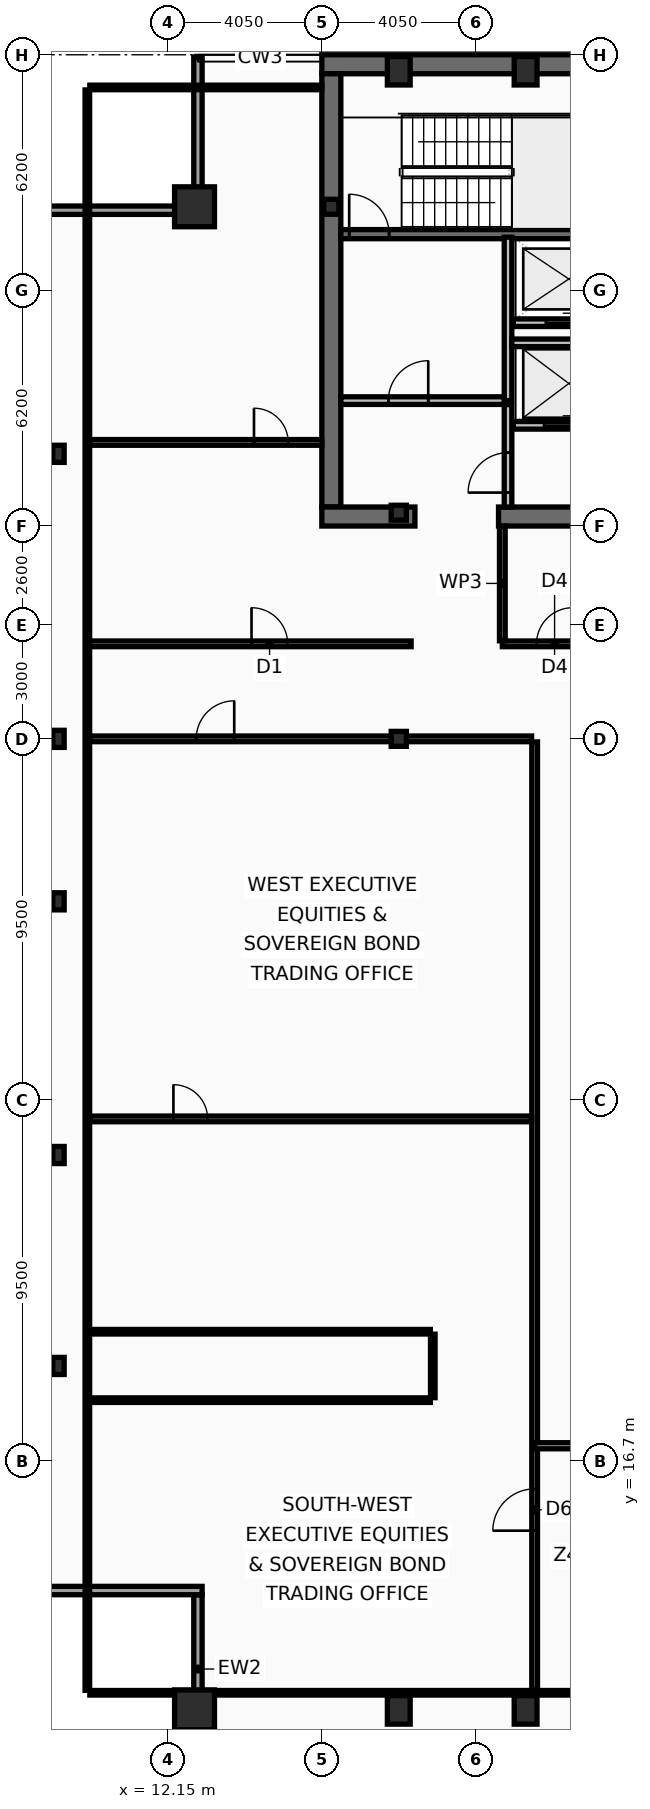
"""IFC4 building model, lengths in metres.
Left out: names, types, materials, properties, quantities, classifications, styles, units other than length and angle.
Written with IfcOpenShell. Run it as: python <this file> out.ifc"""

import sys

from ifc_helpers import new_model, si_unit, direction, frame, frame_2d, origin, origin_2d, place, context, subcontext, project, spatial, rectangle, hollow_rectangle, i_section, extrude, element, fill, save


model = new_model("IFC4")
c1 = context("Model", 3, precision=1e-05, world=origin(), true_north=direction((0.0, 1.0)))
c2 = subcontext(c1, "Body", "Model", "MODEL_VIEW")
j1 = project(units=[si_unit("LENGTHUNIT", "METRE"), si_unit("PLANEANGLEUNIT", "RADIAN")], contexts=[c1])
p1 = place(None, origin())
s1 = spatial("IfcSite", under=j1, at=p1, CompositionType="ELEMENT")
p2 = place(p1, origin())
s2 = spatial("IfcBuilding", under=s1, at=p2, CompositionType="ELEMENT")
p3 = place(p2, frame((0.0, 0.0, 287.8)))
s3 = spatial("IfcBuildingStorey", under=s2, at=p3, CompositionType="ELEMENT", Elevation=287.8)
p4 = place(p3, frame((16.2, 53.45, 0.0), z_axis=(0.0, 0.0, 1.0), x_axis=(1.0, 0.0, 0.0)))
e1 = element("IfcWall", 1, at=p4, inside=s3, PredefinedType="SHEAR", context=c2, shape_type="SweptSolid", body=[
    extrude(rectangle(XDim=40.5, YDim=0.5, at=frame_2d((20.25, 0.0))), origin(), (0.0, 0.0, 1.0), 3.44),
])
p5 = place(p3, frame((16.45, 41.8, 0.0), z_axis=(0.0, 0.0, 1.0), x_axis=(0.0, 1.0, 0.0)))
e2 = element("IfcWall", 2, at=p5, inside=s3, PredefinedType="SHEAR", context=c2, shape_type="SweptSolid", body=[
    extrude(rectangle(XDim=11.4, YDim=0.5, at=frame_2d((5.7, 0.0))), origin(), (0.0, 0.0, 1.0), 3.44),
])
p6 = place(p3, frame((18.65, 41.55, 0.0), z_axis=(0.0, 0.0, 1.0), x_axis=(-1.0, 0.0, 0.0)))
e3 = element("IfcWall", 3, at=p6, inside=s3, PredefinedType="SHEAR", context=c2, shape_type="SweptSolid", body=[
    extrude(rectangle(XDim=2.45, YDim=0.5, at=frame_2d((1.225, 0.0))), origin(), (0.0, 0.0, 1.0), 3.44),
])
p7 = place(p3, frame((32.3, 41.55, 0.0), z_axis=(0.0, 0.0, 1.0), x_axis=(-1.0, 0.0, 0.0)))
e4 = element("IfcWall", 4, at=p7, inside=s3, PredefinedType="SHEAR", context=c2, shape_type="SweptSolid", body=[
    extrude(rectangle(XDim=11.45, YDim=0.5, at=frame_2d((5.725, 0.0))), origin(), (0.0, 0.0, 1.0), 3.44),
])
p8 = place(p3, frame((16.7, 48.98, 0.0), z_axis=(0.0, 0.0, 1.0), x_axis=(1.0, 0.0, 0.0)))
e5 = element("IfcWall", 5, at=p8, inside=s3, PredefinedType="SHEAR", context=c2, shape_type="SweptSolid", body=[
    extrude(rectangle(XDim=7.52, YDim=0.24, at=frame_2d((3.76, 0.0))), origin(), (0.0, 0.0, 1.0), 3.44),
])
p9 = place(p8, frame((0.22, 0.0, 0.0)))
e6 = element("IfcOpeningElement", 6, at=p9, cuts=e5, PredefinedType="OPENING", context=c2, shape_type="SweptSolid", body=[
    extrude(rectangle(XDim=1.05, YDim=2.15, at=frame_2d((0.525, 1.075))), frame((0.0, 0.13, 0.0), z_axis=(0.0, -1.0, 0.0), x_axis=(1.0, 0.0, 0.0)), (0.0, 0.0, 1.0), 0.26),
])
for number, where, z_axis, x_axis in (
    (7, (12.85, 10.15, 0.0), (0.0, 0.0, 1.0), (1.0, 0.0, 0.0)),
    (8, (12.85, 49.7, 0.0), (0.0, 0.0, 1.0), (1.0, 0.0, 0.0)),
):
    element("IfcColumn", number, at=place(p3, frame(where, z_axis=z_axis, x_axis=x_axis)), inside=s3, PredefinedType="COLUMN", context=c2, shape_type="SweptSolid", body=[
        extrude(hollow_rectangle(XDim=1.05, YDim=1.05, WallThickness=0.055, at=origin_2d()), origin(), (0.0, 0.0, 1.0), 3.6),
    ])
for number, where, z_axis, x_axis in (
    (9, (18.225, 10.15, 0.0), (0.0, 0.0, 1.0), (1.0, 0.0, 0.0)),
    (10, (21.562, 10.15, 0.0), (0.0, 0.0, 1.0), (1.0, 0.0, 0.0)),
    (11, (18.225, 53.28, 0.0), (0.0, 0.0, 1.0), (1.0, 0.0, 0.0)),
    (12, (21.562, 53.28, 0.0), (0.0, 0.0, 1.0), (1.0, 0.0, 0.0)),
):
    element("IfcColumn", number, at=place(p3, frame(where, z_axis=z_axis, x_axis=x_axis)), inside=s3, PredefinedType="COLUMN", context=c2, shape_type="SweptSolid", body=[
        extrude(hollow_rectangle(XDim=0.6, YDim=0.75, WallThickness=0.045, at=origin_2d()), origin(), (0.0, 0.0, 1.0), 3.6),
    ])
for number, where, z_axis, x_axis in (
    (13, (9.27, 19.2, 0.0), (0.0, 0.0, 1.0), (1.0, 0.0, 0.0)),
    (14, (9.27, 24.75, 0.0), (0.0, 0.0, 1.0), (1.0, 0.0, 0.0)),
    (15, (9.27, 31.425, 0.0), (0.0, 0.0, 1.0), (1.0, 0.0, 0.0)),
    (16, (9.27, 35.7, 0.0), (0.0, 0.0, 1.0), (1.0, 0.0, 0.0)),
    (17, (9.27, 43.2, 0.0), (0.0, 0.0, 1.0), (1.0, 0.0, 0.0)),
):
    element("IfcColumn", number, at=place(p3, frame(where, z_axis=z_axis, x_axis=x_axis)), inside=s3, PredefinedType="COLUMN", context=c2, shape_type="SweptSolid", body=[
        extrude(i_section(OverallWidth=0.3, OverallDepth=0.45, WebThickness=0.014, FlangeThickness=0.026, at=origin_2d()), origin(), (0.0, 0.0, 1.0), 3.6),
    ])
for number, where, z_axis, x_axis in (
    (18, (16.45, 49.7, 0.0), (0.0, 0.0, 1.0), (1.0, 0.0, 0.0)),
    (19, (18.225, 35.7, 0.0), (0.0, 0.0, 1.0), (1.0, 0.0, 0.0)),
    (20, (18.225, 41.65, 0.0), (0.0, 0.0, 1.0), (1.0, 0.0, 0.0)),
):
    element("IfcColumn", number, at=place(p3, frame(where, z_axis=z_axis, x_axis=x_axis)), inside=s3, PredefinedType="COLUMN", context=c2, shape_type="SweptSolid", body=[
        extrude(i_section(OverallWidth=0.399, OverallDepth=0.393, WebThickness=0.023, FlangeThickness=0.037, at=origin_2d()), origin(), (0.0, 0.0, 1.0), 3.6),
    ])
p10 = place(p3, frame((12.94, 9.27, 0.0), z_axis=(0.0, 0.0, 1.0), x_axis=(0.0, 1.0, 0.0)))
e21 = element("IfcWall", 21, at=p10, inside=s3, PredefinedType="SOLIDWALL", context=c2, shape_type="SweptSolid", body=[
    extrude(rectangle(XDim=3.91, YDim=0.22, at=frame_2d((1.955, 0.0))), origin(), (0.0, 0.0, 1.0), 2.09),
])
p11 = place(p3, frame((13.05, 13.29, 0.0), z_axis=(0.0, 0.0, 1.0), x_axis=(-1.0, 0.0, 0.0)))
e22 = element("IfcWall", 22, at=p11, inside=s3, PredefinedType="SOLIDWALL", context=c2, shape_type="SweptSolid", body=[
    extrude(rectangle(XDim=4.13, YDim=0.22, at=frame_2d((2.065, 0.0))), origin(), (0.0, 0.0, 1.0), 2.88),
])
p12 = place(p3, frame((8.92, 49.61, 0.0), z_axis=(0.0, 0.0, 1.0), x_axis=(1.0, 0.0, 0.0)))
e23 = element("IfcWall", 23, at=p12, inside=s3, PredefinedType="SOLIDWALL", context=c2, shape_type="SweptSolid", body=[
    extrude(rectangle(XDim=4.13, YDim=0.22, at=frame_2d((2.065, 0.0))), origin(), (0.0, 0.0, 1.0), 2.09),
])
p13 = place(p3, frame((12.94, 49.72, 0.0), z_axis=(0.0, 0.0, 1.0), x_axis=(0.0, 1.0, 0.0)))
e24 = element("IfcWall", 24, at=p13, inside=s3, PredefinedType="SOLIDWALL", context=c2, shape_type="SweptSolid", body=[
    extrude(rectangle(XDim=3.91, YDim=0.22, at=frame_2d((1.955, 0.0))), origin(), (0.0, 0.0, 1.0), 2.09),
])
p14 = place(p3, frame((24.21, 43.95, 0.0), z_axis=(0.0, 0.0, 1.0), x_axis=(-1.0, 0.0, 0.0)))
e25 = element("IfcWall", 25, at=p14, inside=s3, PredefinedType="PARTITIONING", context=c2, shape_type="SweptSolid", body=[
    extrude(rectangle(XDim=2.97, YDim=0.2, at=frame_2d((1.485, 0.0))), origin(), (0.0, 0.0, 1.0), 3.44),
])
p15 = place(p14, frame((0.86, 0.0, 0.0)))
e26 = element("IfcOpeningElement", 26, at=p15, cuts=e25, PredefinedType="OPENING", context=c2, shape_type="SweptSolid", body=[
    extrude(rectangle(XDim=1.3, YDim=2.18, at=frame_2d((0.65, 1.09))), frame((0.0, 0.11, 0.0), z_axis=(0.0, -1.0, 0.0), x_axis=(1.0, 0.0, 0.0)), (0.0, 0.0, 1.0), 0.22),
])
p16 = place(p3, frame((24.21, 46.65, 0.0), z_axis=(0.0, 0.0, 1.0), x_axis=(-1.0, 0.0, 0.0)))
e27 = element("IfcWall", 27, at=p16, inside=s3, PredefinedType="PARTITIONING", context=c2, shape_type="SweptSolid", body=[
    extrude(rectangle(XDim=2.97, YDim=0.2, at=frame_2d((1.485, 0.0))), origin(), (0.0, 0.0, 1.0), 3.44),
])
p17 = place(p16, frame((0.91, 0.0, 0.0)))
e28 = element("IfcOpeningElement", 28, at=p17, cuts=e27, PredefinedType="OPENING", context=c2, shape_type="SweptSolid", body=[
    extrude(rectangle(XDim=1.2, YDim=2.18, at=frame_2d((0.6, 1.09))), frame((0.0, 0.11, 0.0), z_axis=(0.0, -1.0, 0.0), x_axis=(1.0, 0.0, 0.0)), (0.0, 0.0, 1.0), 0.22),
])
p18 = place(p3, frame((21.1, 44.6, 0.0), z_axis=(0.0, 0.0, 1.0), x_axis=(0.0, 1.0, 0.0)))
e29 = element("IfcWall", 29, at=p18, inside=s3, PredefinedType="PARTITIONING", context=c2, shape_type="SweptSolid", body=[
    extrude(rectangle(XDim=4.3, YDim=0.2, at=frame_2d((2.15, 0.0))), origin(), (0.0, 0.0, 1.0), 3.44),
])
p19 = place(p3, frame((16.7, 44.6, 0.0), z_axis=(0.0, 0.0, 1.0), x_axis=(1.0, 0.0, 0.0)))
e30 = element("IfcWall", 30, at=p19, inside=s3, PredefinedType="PARTITIONING", context=c2, shape_type="SweptSolid", body=[
    extrude(rectangle(XDim=4.3, YDim=0.2, at=frame_2d((2.15, 0.0))), origin(), (0.0, 0.0, 1.0), 3.44),
])
p20 = place(p19, frame((1.25, 0.0, 0.0)))
e31 = element("IfcOpeningElement", 31, at=p20, cuts=e30, PredefinedType="OPENING", context=c2, shape_type="SweptSolid", body=[
    extrude(rectangle(XDim=1.05, YDim=2.15, at=frame_2d((0.525, 1.075))), frame((0.0, 0.11, 0.0), z_axis=(0.0, -1.0, 0.0), x_axis=(1.0, 0.0, 0.0)), (0.0, 0.0, 1.0), 0.22),
])
p21 = place(p3, frame((21.2, 46.12, 0.0), z_axis=(0.0, 0.0, 1.0), x_axis=(1.0, 0.0, 0.0)))
e32 = element("IfcWall", 32, at=p21, inside=s3, PredefinedType="PARTITIONING", context=c2, shape_type="SweptSolid", body=[
    extrude(rectangle(XDim=3.02, YDim=0.2, at=frame_2d((1.51, 0.0))), origin(), (0.0, 0.0, 1.0), 3.44),
])
p22 = place(p3, frame((21.1, 41.8, 0.0), z_axis=(0.0, 0.0, 1.0), x_axis=(0.0, 1.0, 0.0)))
e33 = element("IfcWall", 33, at=p22, inside=s3, PredefinedType="PARTITIONING", context=c2, shape_type="SweptSolid", body=[
    extrude(rectangle(XDim=2.695, YDim=0.2, at=frame_2d((1.348, 0.0))), origin(), (0.0, 0.0, 1.0), 3.44),
])
p23 = place(p22, frame((0.38, 0.0, 0.0)))
e34 = element("IfcOpeningElement", 34, at=p23, cuts=e33, PredefinedType="OPENING", context=c2, shape_type="SweptSolid", body=[
    extrude(rectangle(XDim=1.05, YDim=2.15, at=frame_2d((0.525, 1.075))), frame((0.0, 0.11, 0.0), z_axis=(0.0, -1.0, 0.0), x_axis=(1.0, 0.0, 0.0)), (0.0, 0.0, 1.0), 0.22),
])
p24 = place(p3, frame((20.95, 38.2, 0.0), z_axis=(0.0, 0.0, 1.0), x_axis=(1.0, 0.0, 0.0)))
e35 = element("IfcWall", 35, at=p24, inside=s3, PredefinedType="PARTITIONING", context=c2, shape_type="SweptSolid", body=[
    extrude(rectangle(XDim=3.35, YDim=0.15, at=frame_2d((1.675, 0.0))), origin(), (0.0, 0.0, 1.0), 3.44),
])
p25 = place(p24, frame((0.9, 0.0, 0.0)))
e36 = element("IfcOpeningElement", 36, at=p25, cuts=e35, PredefinedType="OPENING", context=c2, shape_type="SweptSolid", body=[
    extrude(rectangle(XDim=0.95, YDim=2.05, at=frame_2d((0.475, 1.025))), frame((0.0, 0.085, 0.0), z_axis=(0.0, -1.0, 0.0), x_axis=(1.0, 0.0, 0.0)), (0.0, 0.0, 1.0), 0.17),
])
p26 = place(p3, frame((20.95, 38.28, 0.0), z_axis=(0.0, 0.0, 1.0), x_axis=(0.0, 1.0, 0.0)))
e37 = element("IfcWall", 37, at=p26, inside=s3, PredefinedType="PARTITIONING", context=c2, shape_type="SweptSolid", body=[
    extrude(rectangle(XDim=3.02, YDim=0.15, at=frame_2d((1.51, 0.0))), origin(), (0.0, 0.0, 1.0), 3.44),
])
p27 = place(p3, frame((10.03, 38.2, 0.0), z_axis=(0.0, 0.0, 1.0), x_axis=(1.0, 0.0, 0.0)))
e38 = element("IfcWall", 38, at=p27, inside=s3, PredefinedType="PARTITIONING", context=c2, shape_type="SweptSolid", body=[
    extrude(rectangle(XDim=8.52, YDim=0.15, at=frame_2d((4.26, 0.0))), origin(), (0.0, 0.0, 1.0), 2.78),
])
p28 = place(p27, frame((4.32, 0.0, 0.0)))
e39 = element("IfcOpeningElement", 39, at=p28, cuts=e38, PredefinedType="OPENING", context=c2, shape_type="SweptSolid", body=[
    extrude(rectangle(XDim=0.95, YDim=2.05, at=frame_2d((0.475, 1.025))), frame((0.0, 0.085, 0.0), z_axis=(0.0, -1.0, 0.0), x_axis=(1.0, 0.0, 0.0)), (0.0, 0.0, 1.0), 0.17),
])
p29 = place(p3, frame((10.095, 43.5, 0.0), z_axis=(0.0, 0.0, 1.0), x_axis=(1.0, 0.0, 0.0)))
e40 = element("IfcWall", 40, at=p29, inside=s3, PredefinedType="PARTITIONING", context=c2, shape_type="SweptSolid", body=[
    extrude(rectangle(XDim=6.105, YDim=0.15, at=frame_2d((3.052, 0.0))), origin(), (0.0, 0.0, 1.0), 2.09),
])
p30 = place(p29, frame((4.32, 0.0, 0.0)))
e41 = element("IfcOpeningElement", 41, at=p30, cuts=e40, PredefinedType="OPENING", context=c2, shape_type="SweptSolid", body=[
    extrude(rectangle(XDim=0.9, YDim=2.05, at=frame_2d((0.45, 1.025))), frame((0.0, 0.085, 0.0), z_axis=(0.0, -1.0, 0.0), x_axis=(1.0, 0.0, 0.0)), (0.0, 0.0, 1.0), 0.17),
])
p31 = place(p3, frame((21.8, 10.665, 0.0), z_axis=(0.0, 0.0, 1.0), x_axis=(0.0, 1.0, 0.0)))
e42 = element("IfcWall", 42, at=p31, inside=s3, PredefinedType="PARTITIONING", context=c2, shape_type="SweptSolid", body=[
    extrude(rectangle(XDim=24.955, YDim=0.15, at=frame_2d((12.478, 0.0))), origin(), (0.0, 0.0, 1.0), 3.03),
])
p32 = place(p31, frame((4.2, 0.0, 0.0)))
e43 = element("IfcOpeningElement", 43, at=p32, cuts=e42, PredefinedType="OPENING", context=c2, shape_type="SweptSolid", body=[
    extrude(rectangle(XDim=1.1, YDim=2.1, at=frame_2d((0.55, 1.05))), frame((0.0, 0.085, 0.0), z_axis=(0.0, -1.0, 0.0), x_axis=(1.0, 0.0, 0.0)), (0.0, 0.0, 1.0), 0.17),
])
p33 = place(p3, frame((10.095, 35.7, 0.0), z_axis=(0.0, 0.0, 1.0), x_axis=(1.0, 0.0, 0.0)))
e44 = element("IfcWall", 44, at=p33, inside=s3, PredefinedType="PARTITIONING", context=c2, shape_type="SweptSolid", body=[
    extrude(rectangle(XDim=11.625, YDim=0.15, at=frame_2d((5.812, 0.0))), origin(), (0.0, 0.0, 1.0), 2.09),
])
p34 = place(p33, frame((2.8, 0.0, 0.0)))
e45 = element("IfcOpeningElement", 45, at=p34, cuts=e44, PredefinedType="OPENING", context=c2, shape_type="SweptSolid", body=[
    extrude(rectangle(XDim=1.0, YDim=2.05, at=frame_2d((0.5, 1.025))), frame((0.0, 0.085, 0.0), z_axis=(0.0, -1.0, 0.0), x_axis=(1.0, 0.0, 0.0)), (0.0, 0.0, 1.0), 0.17),
])
p35 = place(p3, frame((10.095, 25.7, 0.0), z_axis=(0.0, 0.0, 1.0), x_axis=(1.0, 0.0, 0.0)))
e46 = element("IfcWall", 46, at=p35, inside=s3, PredefinedType="PARTITIONING", context=c2, shape_type="SweptSolid", body=[
    extrude(rectangle(XDim=11.625, YDim=0.15, at=frame_2d((5.812, 0.0))), origin(), (0.0, 0.0, 1.0), 2.53),
])
p36 = place(p35, frame((2.2, 0.0, 0.0)))
e47 = element("IfcOpeningElement", 47, at=p36, cuts=e46, PredefinedType="OPENING", context=c2, shape_type="SweptSolid", body=[
    extrude(rectangle(XDim=0.9, YDim=2.05, at=frame_2d((0.45, 1.025))), frame((0.0, 0.085, 0.0), z_axis=(0.0, -1.0, 0.0), x_axis=(1.0, 0.0, 0.0)), (0.0, 0.0, 1.0), 0.17),
])
p37 = place(p3, frame((21.8, 17.1, 0.0), z_axis=(0.0, 0.0, 1.0), x_axis=(1.0, 0.0, 0.0)))
e48 = element("IfcWall", 48, at=p37, inside=s3, PredefinedType="PARTITIONING", context=c2, shape_type="SweptSolid", body=[
    extrude(rectangle(XDim=8.334, YDim=0.16, at=frame_2d((4.167, 0.0))), origin(), (0.0, 0.0, 1.0), 2.78),
])
p38 = place(p37, frame((4.0, 0.0, 0.0)))
e49 = element("IfcOpeningElement", 49, at=p38, cuts=e48, PredefinedType="OPENING", context=c2, shape_type="SweptSolid", body=[
    extrude(rectangle(XDim=1.0, YDim=2.05, at=frame_2d((0.5, 1.025))), frame((0.0, 0.09, 0.0), z_axis=(0.0, -1.0, 0.0), x_axis=(1.0, 0.0, 0.0)), (0.0, 0.0, 1.0), 0.18),
])
p39 = place(p3, frame((10.03, 10.665, 0.0), z_axis=(0.0, 0.0, 1.0), x_axis=(0.0, 1.0, 0.0)))
e50 = element("IfcWall", 50, at=p39, inside=s3, PredefinedType="PARTITIONING", context=c2, shape_type="SweptSolid", body=[
    extrude(rectangle(XDim=42.11, YDim=0.12, at=frame_2d((21.055, 0.0))), origin(), (0.0, 0.0, 1.0), 1.83),
])
p40 = place(p3, frame((10.095, 52.84, 0.0), z_axis=(0.0, 0.0, 1.0), x_axis=(1.0, 0.0, 0.0)))
e51 = element("IfcWall", 51, at=p40, inside=s3, PredefinedType="PARTITIONING", context=c2, shape_type="SweptSolid", body=[
    extrude(rectangle(XDim=6.105, YDim=0.12, at=frame_2d((3.052, 0.0))), origin(), (0.0, 0.0, 1.0), 3.44),
])
p41 = place(p3, frame((10.095, 10.6, 0.0), z_axis=(0.0, 0.0, 1.0), x_axis=(1.0, 0.0, 0.0)))
e52 = element("IfcWall", 52, at=p41, inside=s3, PredefinedType="PARTITIONING", context=c2, shape_type="SweptSolid", body=[
    extrude(rectangle(XDim=52.71, YDim=0.12, at=frame_2d((26.355, 0.0))), origin(), (0.0, 0.0, 1.0), 2.09),
])
for number, where, z_axis, x_axis in (
    (53, (10.095, 18.3, 0.0), (0.0, 0.0, 1.0), (1.0, 0.0, 0.0)),
    (54, (10.095, 20.1, 0.0), (0.0, 0.0, 1.0), (1.0, 0.0, 0.0)),
):
    element("IfcWall", number, at=place(p3, frame(where, z_axis=z_axis, x_axis=x_axis)), inside=s3, PredefinedType="PARTITIONING", context=c2, shape_type="SweptSolid", body=[
        extrude(rectangle(XDim=8.96, YDim=0.12, at=frame_2d((4.48, 0.0))), origin(), (0.0, 0.0, 1.0), 2.53),
    ])
p42 = place(p3, frame((19.12, 18.365, 0.0), z_axis=(0.0, 0.0, 1.0), x_axis=(0.0, 1.0, 0.0)))
e55 = element("IfcWall", 55, at=p42, inside=s3, PredefinedType="PARTITIONING", context=c2, shape_type="SweptSolid", body=[
    extrude(rectangle(XDim=1.67, YDim=0.12, at=frame_2d((0.835, 0.0))), origin(), (0.0, 0.0, 1.0), 3.44),
])
p43 = place(p9, origin())
e56 = element("IfcDoor", 56, at=p43, inside=s3, OperationType="SINGLE_SWING_LEFT", PredefinedType="DOOR", context=c2, shape_type="SweptSolid", body=[
    extrude(rectangle(XDim=1.05, YDim=2.15, at=frame_2d((0.525, 1.075))), frame((0.0, 0.025, 0.0), z_axis=(0.0, -1.0, 0.0), x_axis=(1.0, 0.0, 0.0)), (0.0, 0.0, 1.0), 0.05),
])
fill(e6, e56)
p44 = place(p15, origin())
e57 = element("IfcDoor", 57, at=p44, inside=s3, OperationType="SLIDING_TO_LEFT", PredefinedType="DOOR", context=c2, shape_type="SweptSolid", body=[
    extrude(rectangle(XDim=1.3, YDim=2.18, at=frame_2d((0.65, 1.09))), frame((0.0, 0.025, 0.0), z_axis=(0.0, -1.0, 0.0), x_axis=(1.0, 0.0, 0.0)), (0.0, 0.0, 1.0), 0.05),
])
fill(e26, e57)
p45 = place(p17, origin())
e58 = element("IfcDoor", 58, at=p45, inside=s3, OperationType="SLIDING_TO_LEFT", PredefinedType="DOOR", context=c2, shape_type="SweptSolid", body=[
    extrude(rectangle(XDim=1.2, YDim=2.18, at=frame_2d((0.6, 1.09))), frame((0.0, 0.025, 0.0), z_axis=(0.0, -1.0, 0.0), x_axis=(1.0, 0.0, 0.0)), (0.0, 0.0, 1.0), 0.05),
])
fill(e28, e58)
p46 = place(p20, origin())
e59 = element("IfcDoor", 59, at=p46, inside=s3, OperationType="SINGLE_SWING_RIGHT", PredefinedType="DOOR", context=c2, shape_type="SweptSolid", body=[
    extrude(rectangle(XDim=1.05, YDim=2.15, at=frame_2d((0.525, 1.075))), frame((0.0, 0.025, 0.0), z_axis=(0.0, -1.0, 0.0), x_axis=(1.0, 0.0, 0.0)), (0.0, 0.0, 1.0), 0.05),
])
fill(e31, e59)
p47 = place(p23, origin())
e60 = element("IfcDoor", 60, at=p47, inside=s3, OperationType="SINGLE_SWING_LEFT", PredefinedType="DOOR", context=c2, shape_type="SweptSolid", body=[
    extrude(rectangle(XDim=1.05, YDim=2.15, at=frame_2d((0.525, 1.075))), frame((0.0, 0.025, 0.0), z_axis=(0.0, -1.0, 0.0), x_axis=(1.0, 0.0, 0.0)), (0.0, 0.0, 1.0), 0.05),
])
fill(e34, e60)
p48 = place(p25, origin())
e61 = element("IfcDoor", 61, at=p48, inside=s3, OperationType="SINGLE_SWING_RIGHT", PredefinedType="DOOR", context=c2, shape_type="SweptSolid", body=[
    extrude(rectangle(XDim=0.95, YDim=2.05, at=frame_2d((0.475, 1.025))), frame((0.0, 0.025, 0.0), z_axis=(0.0, -1.0, 0.0), x_axis=(1.0, 0.0, 0.0)), (0.0, 0.0, 1.0), 0.05),
])
fill(e36, e61)
p49 = place(p28, origin())
e62 = element("IfcDoor", 62, at=p49, inside=s3, OperationType="SINGLE_SWING_LEFT", PredefinedType="DOOR", context=c2, shape_type="SweptSolid", body=[
    extrude(rectangle(XDim=0.95, YDim=2.05, at=frame_2d((0.475, 1.025))), frame((0.0, 0.025, 0.0), z_axis=(0.0, -1.0, 0.0), x_axis=(1.0, 0.0, 0.0)), (0.0, 0.0, 1.0), 0.05),
])
fill(e39, e62)
p50 = place(p30, origin())
e63 = element("IfcDoor", 63, at=p50, inside=s3, OperationType="SINGLE_SWING_LEFT", PredefinedType="DOOR", context=c2, shape_type="SweptSolid", body=[
    extrude(rectangle(XDim=0.9, YDim=2.05, at=frame_2d((0.45, 1.025))), frame((0.0, 0.025, 0.0), z_axis=(0.0, -1.0, 0.0), x_axis=(1.0, 0.0, 0.0)), (0.0, 0.0, 1.0), 0.05),
])
fill(e41, e63)
p51 = place(p32, origin())
e64 = element("IfcDoor", 64, at=p51, inside=s3, OperationType="SINGLE_SWING_LEFT", PredefinedType="DOOR", context=c2, shape_type="SweptSolid", body=[
    extrude(rectangle(XDim=1.1, YDim=2.1, at=frame_2d((0.55, 1.05))), frame((0.0, 0.025, 0.0), z_axis=(0.0, -1.0, 0.0), x_axis=(1.0, 0.0, 0.0)), (0.0, 0.0, 1.0), 0.05),
])
fill(e43, e64)
p52 = place(p34, origin())
e65 = element("IfcDoor", 65, at=p52, inside=s3, OperationType="SINGLE_SWING_RIGHT", PredefinedType="DOOR", context=c2, shape_type="SweptSolid", body=[
    extrude(rectangle(XDim=1.0, YDim=2.05, at=frame_2d((0.5, 1.025))), frame((0.0, 0.025, 0.0), z_axis=(0.0, -1.0, 0.0), x_axis=(1.0, 0.0, 0.0)), (0.0, 0.0, 1.0), 0.05),
])
fill(e45, e65)
p53 = place(p36, origin())
e66 = element("IfcDoor", 66, at=p53, inside=s3, OperationType="SINGLE_SWING_LEFT", PredefinedType="DOOR", context=c2, shape_type="SweptSolid", body=[
    extrude(rectangle(XDim=0.9, YDim=2.05, at=frame_2d((0.45, 1.025))), frame((0.0, 0.025, 0.0), z_axis=(0.0, -1.0, 0.0), x_axis=(1.0, 0.0, 0.0)), (0.0, 0.0, 1.0), 0.05),
])
fill(e47, e66)
save(model, sys.argv[1])
